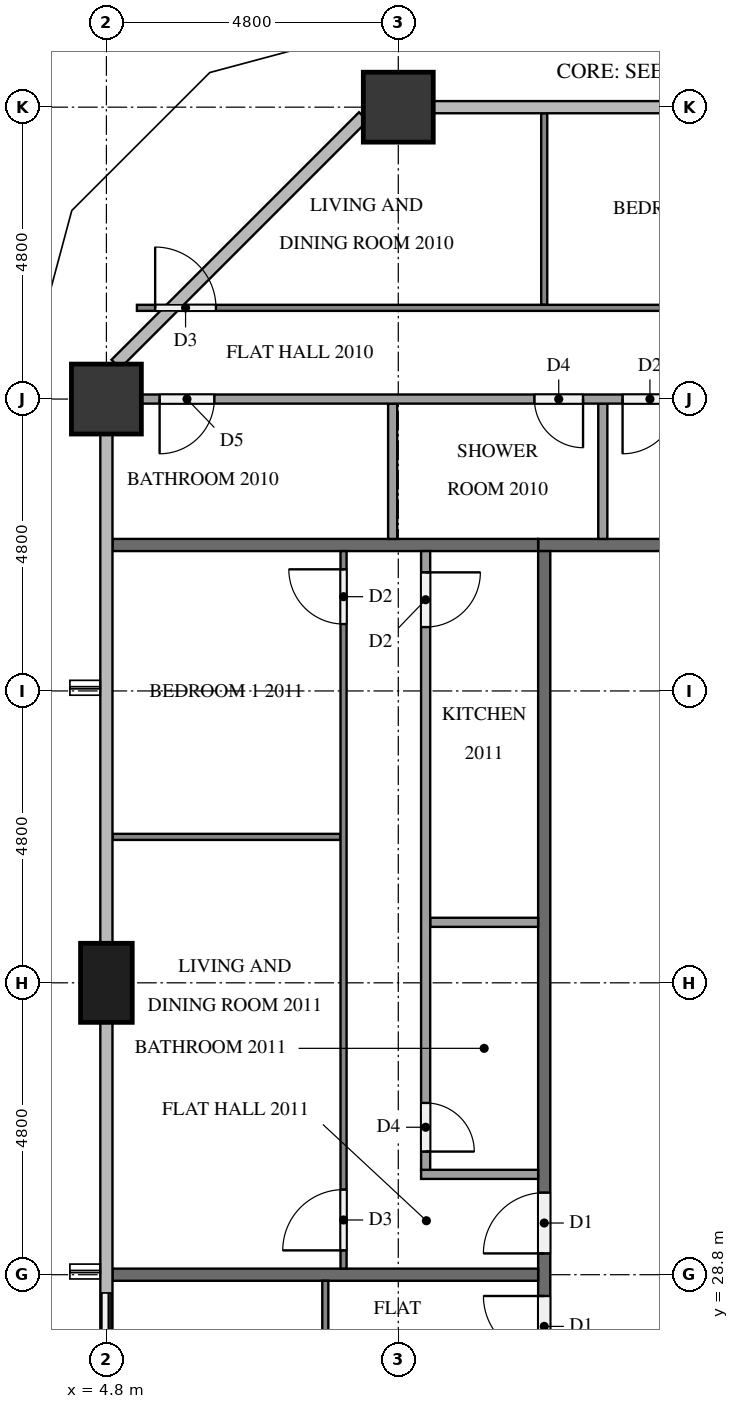
"""IFC4 building model, lengths in metres.
Left out: names, types, materials, properties, quantities, classifications, styles, units other than length and angle.
Written with IfcOpenShell. Run it as: python <this file> out.ifc"""

import sys

from ifc_helpers import new_model, si_unit, direction, frame, frame_2d, origin, origin_2d, place, context, subcontext, project, spatial, rectangle, extrude, element, fill, save


model = new_model("IFC4")
c1 = context("Model", 3, precision=1e-05, world=origin(), true_north=direction((0.0, 1.0)))
c2 = subcontext(c1, "Body", "Model", "MODEL_VIEW")
j1 = project(units=[si_unit("LENGTHUNIT", "METRE"), si_unit("PLANEANGLEUNIT", "RADIAN")], contexts=[c1])
p1 = place(None, origin())
s1 = spatial("IfcSite", under=j1, at=p1, CompositionType="ELEMENT")
p2 = place(p1, origin())
s2 = spatial("IfcBuilding", under=s1, at=p2, CompositionType="ELEMENT")
p3 = place(p2, frame((0.0, 0.0, 80.3)))
s3 = spatial("IfcBuildingStorey", under=s2, at=p3, CompositionType="ELEMENT", Elevation=80.3)
for number, where, z_axis, x_axis in (
    (1, (9.6, 48.0, 0.0), (0.0, 0.0, 1.0), (1.0, 0.0, 0.0)),
    (2, (4.8, 43.2, 0.0), (0.0, 0.0, 1.0), (1.0, 0.0, 0.0)),
):
    element("IfcColumn", number, at=place(p3, frame(where, z_axis=z_axis, x_axis=x_axis)), inside=s3, PredefinedType="COLUMN", context=c2, shape_type="SweptSolid", body=[
        extrude(rectangle(XDim=1.15, YDim=1.15, at=origin_2d()), origin(), (0.0, 0.0, 1.0), 3.1),
    ])
p4 = place(p3, frame((4.8, 33.6, 0.0), z_axis=(0.0, 0.0, 1.0), x_axis=(0.0, 1.0, 0.0)))
e3 = element("IfcColumn", 3, at=p4, inside=s3, PredefinedType="COLUMN", context=c2, shape_type="SweptSolid", body=[
    extrude(rectangle(XDim=1.3, YDim=0.85, at=origin_2d()), origin(), (0.0, 0.0, 1.0), 3.1),
])
p5 = place(p3, frame((4.8, 28.8, 0.0), z_axis=(0.0, 0.0, 1.0), x_axis=(0.0, -1.0, 0.0)))
e4 = element("IfcWall", 4, at=p5, inside=s3, PredefinedType="SOLIDWALL", context=c2, shape_type="SweptSolid", body=[
    extrude(rectangle(XDim=2.4, YDim=0.15, at=frame_2d((1.2, 0.0))), origin(), (0.0, 0.0, 1.0), 3.1),
])
p6 = place(p5, frame((0.3, 0.0, 0.0)))
e5 = element("IfcOpeningElement", 5, at=p6, cuts=e4, PredefinedType="OPENING", context=c2, shape_type="SweptSolid", body=[
    extrude(rectangle(XDim=1.8, YDim=2.4, at=frame_2d((0.9, 1.2))), frame((0.0, 0.085, 0.0), z_axis=(0.0, -1.0, 0.0), x_axis=(1.0, 0.0, 0.0)), (0.0, 0.0, 1.0), 0.17),
])
p7 = place(p3, frame((11.9, 40.8, 0.0), z_axis=(0.0, 0.0, 1.0), x_axis=(1.0, 0.0, 0.0)))
e6 = element("IfcWall", 6, at=p7, inside=s3, PredefinedType="PARTITIONING", context=c2, shape_type="SweptSolid", body=[
    extrude(rectangle(XDim=38.6, YDim=0.2, at=frame_2d((19.3, 0.0))), origin(), (0.0, 0.0, 1.0), 3.1),
])
p8 = place(p7, frame((37.15, 0.0, 0.0)))
e7 = element("IfcOpeningElement", 7, at=p8, cuts=e6, PredefinedType="OPENING", context=c2, shape_type="SweptSolid", body=[
    extrude(rectangle(XDim=1.0, YDim=2.1, at=frame_2d((0.5, 1.05))), frame((0.0, 0.11, 0.0), z_axis=(0.0, -1.0, 0.0), x_axis=(1.0, 0.0, 0.0)), (0.0, 0.0, 1.0), 0.22),
])
p9 = place(p7, frame((10.05, 0.0, 0.0)))
e8 = element("IfcOpeningElement", 8, at=p9, cuts=e6, PredefinedType="OPENING", context=c2, shape_type="SweptSolid", body=[
    extrude(rectangle(XDim=1.0, YDim=2.1, at=frame_2d((0.5, 1.05))), frame((0.0, 0.11, 0.0), z_axis=(0.0, -1.0, 0.0), x_axis=(1.0, 0.0, 0.0)), (0.0, 0.0, 1.0), 0.22),
])
p10 = place(p7, frame((8.35, 0.0, 0.0)))
e9 = element("IfcOpeningElement", 9, at=p10, cuts=e6, PredefinedType="OPENING", context=c2, shape_type="SweptSolid", body=[
    extrude(rectangle(XDim=1.0, YDim=2.1, at=frame_2d((0.5, 1.05))), frame((0.0, 0.11, 0.0), z_axis=(0.0, -1.0, 0.0), x_axis=(1.0, 0.0, 0.0)), (0.0, 0.0, 1.0), 0.22),
])
p11 = place(p3, frame((12.0, 12.1, 0.0), z_axis=(0.0, 0.0, 1.0), x_axis=(0.0, 1.0, 0.0)))
e10 = element("IfcWall", 10, at=p11, inside=s3, PredefinedType="PARTITIONING", context=c2, shape_type="SweptSolid", body=[
    extrude(rectangle(XDim=28.6, YDim=0.2, at=frame_2d((14.3, 0.0))), origin(), (0.0, 0.0, 1.0), 3.1),
])
p12 = place(p11, frame((17.05, 0.0, 0.0)))
e11 = element("IfcOpeningElement", 11, at=p12, cuts=e10, PredefinedType="OPENING", context=c2, shape_type="SweptSolid", body=[
    extrude(rectangle(XDim=1.0, YDim=2.1, at=frame_2d((0.5, 1.05))), frame((0.0, 0.11, 0.0), z_axis=(0.0, -1.0, 0.0), x_axis=(1.0, 0.0, 0.0)), (0.0, 0.0, 1.0), 0.22),
])
p13 = place(p11, frame((15.35, 0.0, 0.0)))
e12 = element("IfcOpeningElement", 12, at=p13, cuts=e10, PredefinedType="OPENING", context=c2, shape_type="SweptSolid", body=[
    extrude(rectangle(XDim=1.0, YDim=2.1, at=frame_2d((0.5, 1.05))), frame((0.0, 0.11, 0.0), z_axis=(0.0, -1.0, 0.0), x_axis=(1.0, 0.0, 0.0)), (0.0, 0.0, 1.0), 0.22),
])
p14 = place(p11, frame((8.15, 0.0, 0.0)))
e13 = element("IfcOpeningElement", 13, at=p14, cuts=e10, PredefinedType="OPENING", context=c2, shape_type="SweptSolid", body=[
    extrude(rectangle(XDim=1.0, YDim=2.1, at=frame_2d((0.5, 1.05))), frame((0.0, 0.11, 0.0), z_axis=(0.0, -1.0, 0.0), x_axis=(1.0, 0.0, 0.0)), (0.0, 0.0, 1.0), 0.22),
])
for number, where, z_axis, x_axis in (
    (14, (4.9, 40.8, 0.0), (0.0, 0.0, 1.0), (1.0, 0.0, 0.0)),
    (15, (4.9, 28.8, 0.0), (0.0, 0.0, 1.0), (1.0, 0.0, 0.0)),
):
    element("IfcWall", number, at=place(p3, frame(where, z_axis=z_axis, x_axis=x_axis)), inside=s3, PredefinedType="PARTITIONING", context=c2, shape_type="SweptSolid", body=[
        extrude(rectangle(XDim=7.0, YDim=0.2, at=frame_2d((3.5, 0.0))), origin(), (0.0, 0.0, 1.0), 3.1),
    ])
p15 = place(p3, frame((12.0, 44.75, 0.0), z_axis=(0.0, 0.0, 1.0), x_axis=(0.0, 1.0, 0.0)))
e16 = element("IfcWall", 16, at=p15, inside=s3, PredefinedType="PARTITIONING", context=c2, shape_type="SweptSolid", body=[
    extrude(rectangle(XDim=3.15, YDim=0.1, at=frame_2d((1.575, 0.0))), origin(), (0.0, 0.0, 1.0), 3.1),
])
p16 = place(p3, frame((5.302, 44.7, 0.0), z_axis=(0.0, 0.0, 1.0), x_axis=(1.0, 0.0, 0.0)))
e17 = element("IfcWall", 17, at=p16, inside=s3, PredefinedType="PARTITIONING", context=c2, shape_type="SweptSolid", body=[
    extrude(rectangle(XDim=16.198, YDim=0.1, at=frame_2d((8.099, 0.0))), origin(), (0.0, 0.0, 1.0), 3.1),
])
p17 = place(p16, frame((11.848, 0.0, 0.0)))
e18 = element("IfcOpeningElement", 18, at=p17, cuts=e17, PredefinedType="OPENING", context=c2, shape_type="SweptSolid", body=[
    extrude(rectangle(XDim=0.9, YDim=2.1, at=frame_2d((0.45, 1.05))), frame((0.0, 0.06, 0.0), z_axis=(0.0, -1.0, 0.0), x_axis=(1.0, 0.0, 0.0)), (0.0, 0.0, 1.0), 0.12),
])
p18 = place(p16, frame((10.248, 0.0, 0.0)))
e19 = element("IfcOpeningElement", 19, at=p18, cuts=e17, PredefinedType="OPENING", context=c2, shape_type="SweptSolid", body=[
    extrude(rectangle(XDim=0.9, YDim=2.1, at=frame_2d((0.45, 1.05))), frame((0.0, 0.06, 0.0), z_axis=(0.0, -1.0, 0.0), x_axis=(1.0, 0.0, 0.0)), (0.0, 0.0, 1.0), 0.12),
])
p19 = place(p16, frame((0.3, 0.0, 0.0)))
e20 = element("IfcOpeningElement", 20, at=p19, cuts=e17, PredefinedType="OPENING", context=c2, shape_type="SweptSolid", body=[
    extrude(rectangle(XDim=1.0, YDim=2.1, at=frame_2d((0.5, 1.05))), frame((0.0, 0.06, 0.0), z_axis=(0.0, -1.0, 0.0), x_axis=(1.0, 0.0, 0.0)), (0.0, 0.0, 1.0), 0.12),
])
for number, where, z_axis, x_axis in (
    (21, (12.963, 40.9, 0.0), (0.0, 0.0, 1.0), (0.0, 1.0, 0.0)),
    (22, (9.508, 40.9, 0.0), (0.0, 0.0, 1.0), (0.0, 1.0, 0.0)),
):
    element("IfcWall", number, at=place(p3, frame(where, z_axis=z_axis, x_axis=x_axis)), inside=s3, PredefinedType="PARTITIONING", context=c2, shape_type="SweptSolid", body=[
        extrude(rectangle(XDim=2.225, YDim=0.15, at=frame_2d((1.113, 0.0))), origin(), (0.0, 0.0, 1.0), 3.1),
    ])
p20 = place(p3, frame((19.875, 43.2, 0.0), z_axis=(0.0, 0.0, 1.0), x_axis=(-1.0, 0.0, 0.0)))
e23 = element("IfcWall", 23, at=p20, inside=s3, PredefinedType="PARTITIONING", context=c2, shape_type="SweptSolid", body=[
    extrude(rectangle(XDim=14.5, YDim=0.15, at=frame_2d((7.25, 0.0))), origin(), (0.0, 0.0, 1.0), 3.1),
])
p21 = place(p20, frame((5.687, 0.0, 0.0)))
e24 = element("IfcOpeningElement", 24, at=p21, cuts=e23, PredefinedType="OPENING", context=c2, shape_type="SweptSolid", body=[
    extrude(rectangle(XDim=0.9, YDim=2.1, at=frame_2d((0.45, 1.05))), frame((0.0, 0.085, 0.0), z_axis=(0.0, -1.0, 0.0), x_axis=(1.0, 0.0, 0.0)), (0.0, 0.0, 1.0), 0.17),
])
p22 = place(p20, frame((7.237, 0.0, 0.0)))
e25 = element("IfcOpeningElement", 25, at=p22, cuts=e23, PredefinedType="OPENING", context=c2, shape_type="SweptSolid", body=[
    extrude(rectangle(XDim=0.8, YDim=2.1, at=frame_2d((0.4, 1.05))), frame((0.0, 0.085, 0.0), z_axis=(0.0, -1.0, 0.0), x_axis=(1.0, 0.0, 0.0)), (0.0, 0.0, 1.0), 0.17),
])
p23 = place(p20, frame((13.3, 0.0, 0.0)))
e26 = element("IfcOpeningElement", 26, at=p23, cuts=e23, PredefinedType="OPENING", context=c2, shape_type="SweptSolid", body=[
    extrude(rectangle(XDim=0.9, YDim=2.1, at=frame_2d((0.45, 1.05))), frame((0.0, 0.085, 0.0), z_axis=(0.0, -1.0, 0.0), x_axis=(1.0, 0.0, 0.0)), (0.0, 0.0, 1.0), 0.17),
])
p24 = place(p3, frame((8.65, 36.0, 0.0), z_axis=(0.0, 0.0, 1.0), x_axis=(-1.0, 0.0, 0.0)))
e27 = element("IfcWall", 27, at=p24, inside=s3, PredefinedType="PARTITIONING", context=c2, shape_type="SweptSolid", body=[
    extrude(rectangle(XDim=3.75, YDim=0.1, at=frame_2d((1.875, 0.0))), origin(), (0.0, 0.0, 1.0), 3.1),
])
p25 = place(p3, frame((8.7, 28.9, 0.0), z_axis=(0.0, 0.0, 1.0), x_axis=(0.0, 1.0, 0.0)))
e28 = element("IfcWall", 28, at=p25, inside=s3, PredefinedType="PARTITIONING", context=c2, shape_type="SweptSolid", body=[
    extrude(rectangle(XDim=11.8, YDim=0.1, at=frame_2d((5.9, 0.0))), origin(), (0.0, 0.0, 1.0), 3.1),
])
p26 = place(p25, frame((0.3, 0.0, 0.0)))
e29 = element("IfcOpeningElement", 29, at=p26, cuts=e28, PredefinedType="OPENING", context=c2, shape_type="SweptSolid", body=[
    extrude(rectangle(XDim=1.0, YDim=2.1, at=frame_2d((0.5, 1.05))), frame((0.0, 0.06, 0.0), z_axis=(0.0, -1.0, 0.0), x_axis=(1.0, 0.0, 0.0)), (0.0, 0.0, 1.0), 0.12),
])
p27 = place(p25, frame((10.6, 0.0, 0.0)))
e30 = element("IfcOpeningElement", 30, at=p27, cuts=e28, PredefinedType="OPENING", context=c2, shape_type="SweptSolid", body=[
    extrude(rectangle(XDim=0.9, YDim=2.1, at=frame_2d((0.45, 1.05))), frame((0.0, 0.06, 0.0), z_axis=(0.0, -1.0, 0.0), x_axis=(1.0, 0.0, 0.0)), (0.0, 0.0, 1.0), 0.12),
])
p28 = place(p3, frame((11.9, 34.595, 0.0), z_axis=(0.0, 0.0, 1.0), x_axis=(-1.0, 0.0, 0.0)))
e31 = element("IfcWall", 31, at=p28, inside=s3, PredefinedType="PARTITIONING", context=c2, shape_type="SweptSolid", body=[
    extrude(rectangle(XDim=1.775, YDim=0.15, at=frame_2d((0.887, 0.0))), origin(), (0.0, 0.0, 1.0), 3.1),
])
p29 = place(p3, frame((11.9, 30.45, 0.0), z_axis=(0.0, 0.0, 1.0), x_axis=(-1.0, 0.0, 0.0)))
e32 = element("IfcWall", 32, at=p29, inside=s3, PredefinedType="PARTITIONING", context=c2, shape_type="SweptSolid", body=[
    extrude(rectangle(XDim=1.925, YDim=0.15, at=frame_2d((0.962, 0.0))), origin(), (0.0, 0.0, 1.0), 3.1),
])
p30 = place(p3, frame((10.05, 40.7, 0.0), z_axis=(0.0, 0.0, 1.0), x_axis=(0.0, -1.0, 0.0)))
e33 = element("IfcWall", 33, at=p30, inside=s3, PredefinedType="PARTITIONING", context=c2, shape_type="SweptSolid", body=[
    extrude(rectangle(XDim=10.175, YDim=0.15, at=frame_2d((5.087, 0.0))), origin(), (0.0, 0.0, 1.0), 3.1),
])
p31 = place(p30, frame((9.075, 0.0, 0.0)))
e34 = element("IfcOpeningElement", 34, at=p31, cuts=e33, PredefinedType="OPENING", context=c2, shape_type="SweptSolid", body=[
    extrude(rectangle(XDim=0.8, YDim=2.1, at=frame_2d((0.4, 1.05))), frame((0.0, 0.085, 0.0), z_axis=(0.0, -1.0, 0.0), x_axis=(1.0, 0.0, 0.0)), (0.0, 0.0, 1.0), 0.17),
])
p32 = place(p30, frame((0.35, 0.0, 0.0)))
e35 = element("IfcOpeningElement", 35, at=p32, cuts=e33, PredefinedType="OPENING", context=c2, shape_type="SweptSolid", body=[
    extrude(rectangle(XDim=0.9, YDim=2.1, at=frame_2d((0.45, 1.05))), frame((0.0, 0.085, 0.0), z_axis=(0.0, -1.0, 0.0), x_axis=(1.0, 0.0, 0.0)), (0.0, 0.0, 1.0), 0.17),
])
p33 = place(p3, frame((8.4, 21.7, 0.0), z_axis=(0.0, 0.0, 1.0), x_axis=(0.0, 1.0, 0.0)))
e36 = element("IfcWall", 36, at=p33, inside=s3, PredefinedType="PARTITIONING", context=c2, shape_type="SweptSolid", body=[
    extrude(rectangle(XDim=7.0, YDim=0.1, at=frame_2d((3.5, 0.0))), origin(), (0.0, 0.0, 1.0), 3.1),
])
p34 = place(p33, frame((0.3, 0.0, 0.0)))
e37 = element("IfcOpeningElement", 37, at=p34, cuts=e36, PredefinedType="OPENING", context=c2, shape_type="SweptSolid", body=[
    extrude(rectangle(XDim=1.0, YDim=2.1, at=frame_2d((0.5, 1.05))), frame((0.0, 0.06, 0.0), z_axis=(0.0, -1.0, 0.0), x_axis=(1.0, 0.0, 0.0)), (0.0, 0.0, 1.0), 0.12),
])
p35 = place(p6, origin())
e38 = element("IfcDoor", 38, at=p35, inside=s3, OperationType="SLIDING_TO_LEFT", PredefinedType="DOOR", context=c2, shape_type="SweptSolid", body=[
    extrude(rectangle(XDim=1.8, YDim=2.4, at=frame_2d((0.9, 1.2))), frame((0.0, 0.025, 0.0), z_axis=(0.0, -1.0, 0.0), x_axis=(1.0, 0.0, 0.0)), (0.0, 0.0, 1.0), 0.05),
])
fill(e5, e38)
p36 = place(p12, origin())
e39 = element("IfcDoor", 39, at=p36, inside=s3, OperationType="SINGLE_SWING_LEFT", PredefinedType="DOOR", context=c2, shape_type="SweptSolid", body=[
    extrude(rectangle(XDim=1.0, YDim=2.1, at=frame_2d((0.5, 1.05))), frame((0.0, 0.025, 0.0), z_axis=(0.0, -1.0, 0.0), x_axis=(1.0, 0.0, 0.0)), (0.0, 0.0, 1.0), 0.05),
])
fill(e11, e39)
p37 = place(p13, origin())
e40 = element("IfcDoor", 40, at=p37, inside=s3, OperationType="SINGLE_SWING_RIGHT", PredefinedType="DOOR", context=c2, shape_type="SweptSolid", body=[
    extrude(rectangle(XDim=1.0, YDim=2.1, at=frame_2d((0.5, 1.05))), frame((0.0, 0.025, 0.0), z_axis=(0.0, -1.0, 0.0), x_axis=(1.0, 0.0, 0.0)), (0.0, 0.0, 1.0), 0.05),
])
fill(e12, e40)
p38 = place(p19, origin())
e41 = element("IfcDoor", 41, at=p38, inside=s3, OperationType="SINGLE_SWING_LEFT", PredefinedType="DOOR", context=c2, shape_type="SweptSolid", body=[
    extrude(rectangle(XDim=1.0, YDim=2.1, at=frame_2d((0.5, 1.05))), frame((0.0, 0.025, 0.0), z_axis=(0.0, -1.0, 0.0), x_axis=(1.0, 0.0, 0.0)), (0.0, 0.0, 1.0), 0.05),
])
fill(e20, e41)
p39 = place(p21, origin())
e42 = element("IfcDoor", 42, at=p39, inside=s3, OperationType="SINGLE_SWING_RIGHT", PredefinedType="DOOR", context=c2, shape_type="SweptSolid", body=[
    extrude(rectangle(XDim=0.9, YDim=2.1, at=frame_2d((0.45, 1.05))), frame((0.0, 0.025, 0.0), z_axis=(0.0, -1.0, 0.0), x_axis=(1.0, 0.0, 0.0)), (0.0, 0.0, 1.0), 0.05),
])
fill(e24, e42)
p40 = place(p22, origin())
e43 = element("IfcDoor", 43, at=p40, inside=s3, OperationType="SINGLE_SWING_LEFT", PredefinedType="DOOR", context=c2, shape_type="SweptSolid", body=[
    extrude(rectangle(XDim=0.8, YDim=2.1, at=frame_2d((0.4, 1.05))), frame((0.0, 0.025, 0.0), z_axis=(0.0, -1.0, 0.0), x_axis=(1.0, 0.0, 0.0)), (0.0, 0.0, 1.0), 0.05),
])
fill(e25, e43)
p41 = place(p23, origin())
e44 = element("IfcDoor", 44, at=p41, inside=s3, OperationType="SINGLE_SWING_RIGHT", PredefinedType="DOOR", context=c2, shape_type="SweptSolid", body=[
    extrude(rectangle(XDim=0.9, YDim=2.1, at=frame_2d((0.45, 1.05))), frame((0.0, 0.025, 0.0), z_axis=(0.0, -1.0, 0.0), x_axis=(1.0, 0.0, 0.0)), (0.0, 0.0, 1.0), 0.05),
])
fill(e26, e44)
p42 = place(p26, origin())
e45 = element("IfcDoor", 45, at=p42, inside=s3, OperationType="SINGLE_SWING_LEFT", PredefinedType="DOOR", context=c2, shape_type="SweptSolid", body=[
    extrude(rectangle(XDim=1.0, YDim=2.1, at=frame_2d((0.5, 1.05))), frame((0.0, 0.025, 0.0), z_axis=(0.0, -1.0, 0.0), x_axis=(1.0, 0.0, 0.0)), (0.0, 0.0, 1.0), 0.05),
])
fill(e29, e45)
p43 = place(p27, origin())
e46 = element("IfcDoor", 46, at=p43, inside=s3, OperationType="SINGLE_SWING_RIGHT", PredefinedType="DOOR", context=c2, shape_type="SweptSolid", body=[
    extrude(rectangle(XDim=0.9, YDim=2.1, at=frame_2d((0.45, 1.05))), frame((0.0, 0.025, 0.0), z_axis=(0.0, -1.0, 0.0), x_axis=(1.0, 0.0, 0.0)), (0.0, 0.0, 1.0), 0.05),
])
fill(e30, e46)
p44 = place(p31, origin())
e47 = element("IfcDoor", 47, at=p44, inside=s3, OperationType="SINGLE_SWING_RIGHT", PredefinedType="DOOR", context=c2, shape_type="SweptSolid", body=[
    extrude(rectangle(XDim=0.8, YDim=2.1, at=frame_2d((0.4, 1.05))), frame((0.0, 0.025, 0.0), z_axis=(0.0, -1.0, 0.0), x_axis=(1.0, 0.0, 0.0)), (0.0, 0.0, 1.0), 0.05),
])
fill(e34, e47)
p45 = place(p32, origin())
e48 = element("IfcDoor", 48, at=p45, inside=s3, OperationType="SINGLE_SWING_LEFT", PredefinedType="DOOR", context=c2, shape_type="SweptSolid", body=[
    extrude(rectangle(XDim=0.9, YDim=2.1, at=frame_2d((0.45, 1.05))), frame((0.0, 0.025, 0.0), z_axis=(0.0, -1.0, 0.0), x_axis=(1.0, 0.0, 0.0)), (0.0, 0.0, 1.0), 0.05),
])
fill(e35, e48)
save(model, sys.argv[1])
